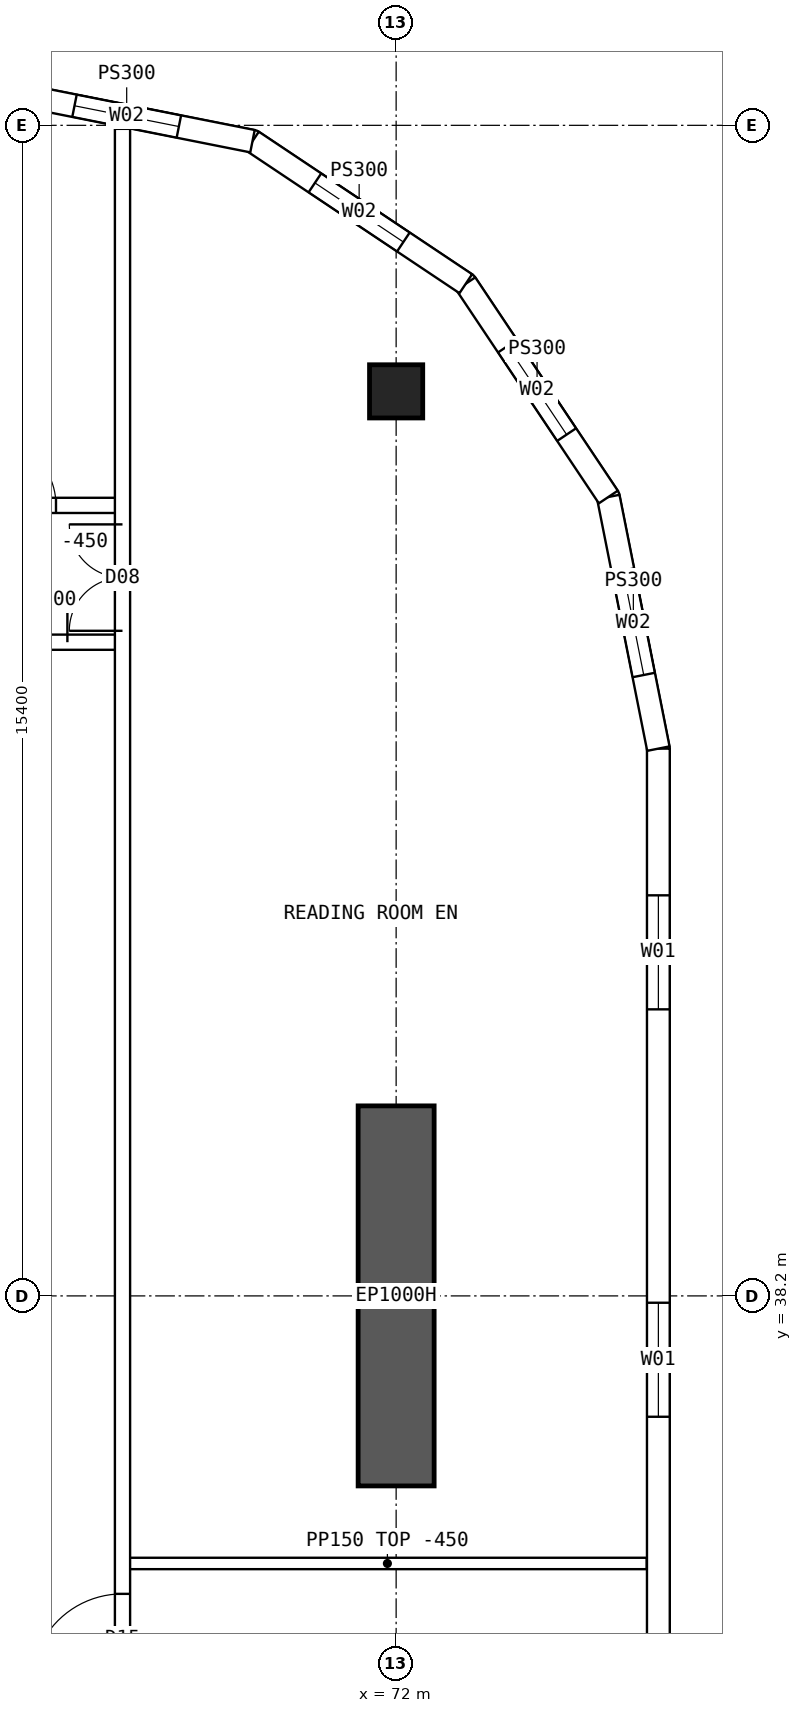
"""IFC4 building model, lengths in metres.
Left out: names, types, materials, properties, quantities, classifications, styles, units other than length and angle.
Written with IfcOpenShell. Run it as: python <this file> out.ifc"""

import sys

from ifc_helpers import new_model, si_unit, direction, frame, frame_2d, origin, origin_2d, place, context, subcontext, project, spatial, polyline, rectangle, hollow_rectangle, outline, extrude, element, fill, save


model = new_model("IFC4")
c1 = context("Model", 3, precision=1e-05, world=origin(), true_north=direction((0.0, 1.0)))
c2 = subcontext(c1, "Body", "Model", "MODEL_VIEW")
j1 = project(units=[si_unit("LENGTHUNIT", "METRE"), si_unit("PLANEANGLEUNIT", "RADIAN")], contexts=[c1])
p1 = place(None, origin())
s1 = spatial("IfcSite", under=j1, at=p1, CompositionType="ELEMENT")
p2 = place(p1, origin())
s2 = spatial("IfcBuilding", under=s1, at=p2, CompositionType="ELEMENT")
p3 = place(p2, frame((0.0, 0.0, 174.85)))
s3 = spatial("IfcBuildingStorey", under=s2, at=p3, CompositionType="ELEMENT", Elevation=174.85)
p4 = place(p3, frame((72.0, 50.1, 0.0), z_axis=(0.0, 0.0, 1.0), x_axis=(1.0, 0.0, 0.0)))
e1 = element("IfcColumn", 1, at=p4, inside=s3, PredefinedType="COLUMN", context=c2, shape_type="SweptSolid", body=[
    extrude(hollow_rectangle(XDim=0.7, YDim=0.7, WallThickness=0.07, at=origin_2d()), origin(), (0.0, 0.0, 1.0), 3.75),
])
p5 = place(p3, frame((72.0, 35.7, 0.0), z_axis=(0.0, 0.0, 1.0), x_axis=(0.0, 1.0, 0.0)))
e2 = element("IfcWall", 2, at=p5, inside=s3, PredefinedType="SHEAR", context=c2, shape_type="SweptSolid", body=[
    extrude(rectangle(XDim=5.0, YDim=1.0, at=frame_2d((2.5, 0.0))), origin(), (0.0, 0.0, 1.0), 3.75),
])
p6 = place(p3, frame((75.45, 18.6, 0.0), z_axis=(0.0, 0.0, 1.0), x_axis=(0.0, 1.0, 0.0)))
e3 = element("IfcWall", 3, at=p6, inside=s3, PredefinedType="SOLIDWALL", context=c2, shape_type="SweptSolid", body=[
    extrude(outline(polyline([(-0.015, -0.15), (26.815, -0.15), (26.785, 0.15), (0.015, 0.15), (-0.015, -0.15)])), origin(), (0.0, 0.0, 1.0), 3.3),
])
p7 = place(p6, frame((1.93, 0.0, 0.9)))
e4 = element("IfcOpeningElement", 4, at=p7, cuts=e3, PredefinedType="OPENING", context=c2, shape_type="SweptSolid", body=[
    extrude(rectangle(XDim=1.5, YDim=2.0, at=frame_2d((0.75, 1.0))), frame((0.0, 0.16, 0.0), z_axis=(0.0, -1.0, 0.0), x_axis=(1.0, 0.0, 0.0)), (0.0, 0.0, 1.0), 0.32),
])
p8 = place(p6, frame((7.29, 0.0, 0.9)))
e5 = element("IfcOpeningElement", 5, at=p8, cuts=e3, PredefinedType="OPENING", context=c2, shape_type="SweptSolid", body=[
    extrude(rectangle(XDim=1.5, YDim=2.0, at=frame_2d((0.75, 1.0))), frame((0.0, 0.16, 0.0), z_axis=(0.0, -1.0, 0.0), x_axis=(1.0, 0.0, 0.0)), (0.0, 0.0, 1.0), 0.32),
])
p9 = place(p6, frame((12.65, 0.0, 0.9)))
e6 = element("IfcOpeningElement", 6, at=p9, cuts=e3, PredefinedType="OPENING", context=c2, shape_type="SweptSolid", body=[
    extrude(rectangle(XDim=1.5, YDim=2.0, at=frame_2d((0.75, 1.0))), frame((0.0, 0.16, 0.0), z_axis=(0.0, -1.0, 0.0), x_axis=(1.0, 0.0, 0.0)), (0.0, 0.0, 1.0), 0.32),
])
p10 = place(p6, frame((18.01, 0.0, 0.9)))
e7 = element("IfcOpeningElement", 7, at=p10, cuts=e3, PredefinedType="OPENING", context=c2, shape_type="SweptSolid", body=[
    extrude(rectangle(XDim=1.5, YDim=2.0, at=frame_2d((0.75, 1.0))), frame((0.0, 0.16, 0.0), z_axis=(0.0, -1.0, 0.0), x_axis=(1.0, 0.0, 0.0)), (0.0, 0.0, 1.0), 0.32),
])
p11 = place(p6, frame((23.37, 0.0, 0.9)))
e8 = element("IfcOpeningElement", 8, at=p11, cuts=e3, PredefinedType="OPENING", context=c2, shape_type="SweptSolid", body=[
    extrude(rectangle(XDim=1.5, YDim=2.0, at=frame_2d((0.75, 1.0))), frame((0.0, 0.16, 0.0), z_axis=(0.0, -1.0, 0.0), x_axis=(1.0, 0.0, 0.0)), (0.0, 0.0, 1.0), 0.32),
])
p12 = place(p3, frame((75.45, 45.4, 0.0), z_axis=(0.0, 0.0, 1.0), x_axis=(-0.19508664885, 0.980786011034, 0.0)))
e9 = element("IfcWall", 9, at=p12, inside=s3, PredefinedType="SOLIDWALL", context=c2, shape_type="SweptSolid", body=[
    extrude(outline(polyline([(-0.015, -0.15), (3.405, -0.15), (3.345, 0.15), (0.015, 0.15), (-0.015, -0.15)])), origin(), (0.0, 0.0, 1.0), 3.3),
])
p13 = place(p12, frame((0.988, 0.0, 0.9)))
e10 = element("IfcOpeningElement", 10, at=p13, cuts=e9, PredefinedType="OPENING", context=c2, shape_type="SweptSolid", body=[
    extrude(rectangle(XDim=1.4, YDim=1.8, at=frame_2d((0.7, 0.9))), frame((0.0, 0.16, 0.0), z_axis=(0.0, -1.0, 0.0), x_axis=(1.0, 0.0, 0.0)), (0.0, 0.0, 1.0), 0.32),
])
p14 = place(p3, frame((74.792, 48.71, 0.0), z_axis=(0.0, 0.0, 1.0), x_axis=(-0.555534554399, 0.831493450887, 0.0)))
e11 = element("IfcWall", 11, at=p14, inside=s3, PredefinedType="SOLIDWALL", context=c2, shape_type="SweptSolid", body=[
    extrude(outline(polyline([(-0.03, -0.15), (3.405, -0.15), (3.345, 0.15), (0.03, 0.15), (-0.03, -0.15)])), origin(), (0.0, 0.0, 1.0), 3.3),
])
p15 = place(p14, frame((0.988, 0.0, 0.9)))
e12 = element("IfcOpeningElement", 12, at=p15, cuts=e11, PredefinedType="OPENING", context=c2, shape_type="SweptSolid", body=[
    extrude(rectangle(XDim=1.4, YDim=1.8, at=frame_2d((0.7, 0.9))), frame((0.0, 0.16, 0.0), z_axis=(0.0, -1.0, 0.0), x_axis=(1.0, 0.0, 0.0)), (0.0, 0.0, 1.0), 0.32),
])
p16 = place(p3, frame((72.917, 51.517, 0.0), z_axis=(0.0, 0.0, 1.0), x_axis=(-0.831493450887, 0.555534554399, 0.0)))
e13 = element("IfcWall", 13, at=p16, inside=s3, PredefinedType="SOLIDWALL", context=c2, shape_type="SweptSolid", body=[
    extrude(outline(polyline([(-0.03, -0.15), (3.405, -0.15), (3.345, 0.15), (0.03, 0.15), (-0.03, -0.15)])), origin(), (0.0, 0.0, 1.0), 3.3),
])
p17 = place(p16, frame((0.988, 0.0, 0.9)))
e14 = element("IfcOpeningElement", 14, at=p17, cuts=e13, PredefinedType="OPENING", context=c2, shape_type="SweptSolid", body=[
    extrude(rectangle(XDim=1.4, YDim=1.8, at=frame_2d((0.7, 0.9))), frame((0.0, 0.16, 0.0), z_axis=(0.0, -1.0, 0.0), x_axis=(1.0, 0.0, 0.0)), (0.0, 0.0, 1.0), 0.32),
])
p18 = place(p3, frame((70.11, 53.392, 0.0), z_axis=(0.0, 0.0, 1.0), x_axis=(-0.98078325777, 0.195100490205, 0.0)))
e15 = element("IfcWall", 15, at=p18, inside=s3, PredefinedType="SOLIDWALL", context=c2, shape_type="SweptSolid", body=[
    extrude(outline(polyline([(-0.03, -0.15), (3.405, -0.15), (3.345, 0.15), (0.03, 0.15), (-0.03, -0.15)])), origin(), (0.0, 0.0, 1.0), 3.3),
])
p19 = place(p18, frame((0.988, 0.0, 0.9)))
e16 = element("IfcOpeningElement", 16, at=p19, cuts=e15, PredefinedType="OPENING", context=c2, shape_type="SweptSolid", body=[
    extrude(rectangle(XDim=1.4, YDim=1.8, at=frame_2d((0.7, 0.9))), frame((0.0, 0.16, 0.0), z_axis=(0.0, -1.0, 0.0), x_axis=(1.0, 0.0, 0.0)), (0.0, 0.0, 1.0), 0.32),
])
p20 = place(p3, frame((66.425, 48.6, 0.0), z_axis=(0.0, 0.0, 1.0), x_axis=(1.0, 0.0, 0.0)))
e17 = element("IfcWall", 17, at=p20, inside=s3, PredefinedType="SOLIDWALL", context=c2, shape_type="SweptSolid", body=[
    extrude(rectangle(XDim=1.975, YDim=0.2, at=frame_2d((0.987, 0.0))), origin(), (0.0, 0.0, 1.0), 3.3),
])
p21 = place(p20, frame((0.2, 0.0, 0.0)))
e18 = element("IfcOpeningElement", 18, at=p21, cuts=e17, PredefinedType="OPENING", context=c2, shape_type="SweptSolid", body=[
    extrude(rectangle(XDim=0.9, YDim=2.1, at=frame_2d((0.45, 1.05))), frame((0.0, 0.11, 0.0), z_axis=(0.0, -1.0, 0.0), x_axis=(1.0, 0.0, 0.0)), (0.0, 0.0, 1.0), 0.22),
])
p22 = place(p3, frame((66.425, 46.8, 0.0), z_axis=(0.0, 0.0, 1.0), x_axis=(1.0, 0.0, 0.0)))
e19 = element("IfcWall", 19, at=p22, inside=s3, PredefinedType="SOLIDWALL", context=c2, shape_type="SweptSolid", body=[
    extrude(rectangle(XDim=1.975, YDim=0.2, at=frame_2d((0.987, 0.0))), origin(), (0.0, 0.0, 1.0), 3.3),
])
p23 = place(p22, frame((0.05, 0.0, 0.0)))
e20 = element("IfcOpeningElement", 20, at=p23, cuts=e19, PredefinedType="OPENING", context=c2, shape_type="SweptSolid", body=[
    extrude(rectangle(XDim=1.2, YDim=2.1, at=frame_2d((0.6, 1.05))), frame((0.0, 0.11, 0.0), z_axis=(0.0, -1.0, 0.0), x_axis=(1.0, 0.0, 0.0)), (0.0, 0.0, 1.0), 0.22),
])
p24 = place(p3, frame((68.4, 10.446, 0.0), z_axis=(0.0, 0.0, 1.0), x_axis=(0.0, 1.0, 0.0)))
e21 = element("IfcWall", 21, at=p24, inside=s3, PredefinedType="SOLIDWALL", context=c2, shape_type="SweptSolid", body=[
    extrude(rectangle(XDim=43.107, YDim=0.2, at=frame_2d((21.554, 0.0))), origin(), (0.0, 0.0, 1.0), 3.3),
])
p25 = place(p24, frame((13.914, 0.0, 0.0)))
e22 = element("IfcOpeningElement", 22, at=p25, cuts=e21, PredefinedType="OPENING", context=c2, shape_type="SweptSolid", body=[
    extrude(rectangle(XDim=1.2, YDim=2.1, at=frame_2d((0.6, 1.05))), frame((0.0, 0.11, 0.0), z_axis=(0.0, -1.0, 0.0), x_axis=(1.0, 0.0, 0.0)), (0.0, 0.0, 1.0), 0.22),
])
p26 = place(p24, frame((22.634, 0.0, 0.0)))
e23 = element("IfcOpeningElement", 23, at=p26, cuts=e21, PredefinedType="OPENING", context=c2, shape_type="SweptSolid", body=[
    extrude(rectangle(XDim=1.2, YDim=2.1, at=frame_2d((0.6, 1.05))), frame((0.0, 0.11, 0.0), z_axis=(0.0, -1.0, 0.0), x_axis=(1.0, 0.0, 0.0)), (0.0, 0.0, 1.0), 0.22),
])
p27 = place(p24, frame((5.104, 0.0, 0.0)))
e24 = element("IfcOpeningElement", 24, at=p27, cuts=e21, PredefinedType="OPENING", context=c2, shape_type="SweptSolid", body=[
    extrude(rectangle(XDim=1.4, YDim=2.1, at=frame_2d((0.7, 1.05))), frame((0.0, 0.11, 0.0), z_axis=(0.0, -1.0, 0.0), x_axis=(1.0, 0.0, 0.0)), (0.0, 0.0, 1.0), 0.22),
])
p28 = place(p24, frame((36.504, 0.0, 0.0)))
e25 = element("IfcOpeningElement", 25, at=p28, cuts=e21, PredefinedType="OPENING", context=c2, shape_type="SweptSolid", body=[
    extrude(rectangle(XDim=1.4, YDim=2.1, at=frame_2d((0.7, 1.05))), frame((0.0, 0.11, 0.0), z_axis=(0.0, -1.0, 0.0), x_axis=(1.0, 0.0, 0.0)), (0.0, 0.0, 1.0), 0.22),
])
p29 = place(p3, frame((68.475, 34.68, 0.0), z_axis=(0.0, 0.0, 1.0), x_axis=(1.0, 0.0, 0.0)))
e26 = element("IfcWall", 26, at=p29, inside=s3, PredefinedType="PARTITIONING", context=c2, shape_type="SweptSolid", body=[
    extrude(outline(polyline([(0.0, 0.0), (6.82, 0.0), (6.82, 3.3), (3.827, 3.3), (3.825, 2.85), (3.227, 2.85), (3.225, 3.3), (0.0, 3.3), (0.0, 0.0)])), frame((0.0, 0.075, 0.0), z_axis=(0.0, -1.0, 0.0), x_axis=(1.0, 0.0, 0.0)), (0.0, 0.0, 1.0), 0.15),
])
p30 = place(p10, origin())
e27 = element("IfcWindow", 27, at=p30, inside=s3, PartitioningType="SINGLE_PANEL", PredefinedType="WINDOW", context=c2, shape_type="SweptSolid", body=[
    extrude(rectangle(XDim=1.5, YDim=2.0, at=frame_2d((0.75, 1.0))), frame((0.0, 0.03, 0.0), z_axis=(0.0, -1.0, 0.0), x_axis=(1.0, 0.0, 0.0)), (0.0, 0.0, 1.0), 0.06),
])
fill(e7, e27)
p31 = place(p11, origin())
e28 = element("IfcWindow", 28, at=p31, inside=s3, PartitioningType="SINGLE_PANEL", PredefinedType="WINDOW", context=c2, shape_type="SweptSolid", body=[
    extrude(rectangle(XDim=1.5, YDim=2.0, at=frame_2d((0.75, 1.0))), frame((0.0, 0.03, 0.0), z_axis=(0.0, -1.0, 0.0), x_axis=(1.0, 0.0, 0.0)), (0.0, 0.0, 1.0), 0.06),
])
fill(e8, e28)
p32 = place(p13, origin())
e29 = element("IfcWindow", 29, at=p32, inside=s3, PartitioningType="SINGLE_PANEL", PredefinedType="WINDOW", context=c2, shape_type="SweptSolid", body=[
    extrude(rectangle(XDim=1.4, YDim=1.8, at=frame_2d((0.7, 0.9))), frame((0.0, 0.03, 0.0), z_axis=(0.0, -1.0, 0.0), x_axis=(1.0, 0.0, 0.0)), (0.0, 0.0, 1.0), 0.06),
])
fill(e10, e29)
p33 = place(p15, origin())
e30 = element("IfcWindow", 30, at=p33, inside=s3, PartitioningType="SINGLE_PANEL", PredefinedType="WINDOW", context=c2, shape_type="SweptSolid", body=[
    extrude(rectangle(XDim=1.4, YDim=1.8, at=frame_2d((0.7, 0.9))), frame((0.0, 0.03, 0.0), z_axis=(0.0, -1.0, 0.0), x_axis=(1.0, 0.0, 0.0)), (0.0, 0.0, 1.0), 0.06),
])
fill(e12, e30)
p34 = place(p17, origin())
e31 = element("IfcWindow", 31, at=p34, inside=s3, PartitioningType="SINGLE_PANEL", PredefinedType="WINDOW", context=c2, shape_type="SweptSolid", body=[
    extrude(rectangle(XDim=1.4, YDim=1.8, at=frame_2d((0.7, 0.9))), frame((0.0, 0.03, 0.0), z_axis=(0.0, -1.0, 0.0), x_axis=(1.0, 0.0, 0.0)), (0.0, 0.0, 1.0), 0.06),
])
fill(e14, e31)
p35 = place(p19, origin())
e32 = element("IfcWindow", 32, at=p35, inside=s3, PartitioningType="SINGLE_PANEL", PredefinedType="WINDOW", context=c2, shape_type="SweptSolid", body=[
    extrude(rectangle(XDim=1.4, YDim=1.8, at=frame_2d((0.7, 0.9))), frame((0.0, 0.03, 0.0), z_axis=(0.0, -1.0, 0.0), x_axis=(1.0, 0.0, 0.0)), (0.0, 0.0, 1.0), 0.06),
])
fill(e16, e32)
p36 = place(p23, origin())
e33 = element("IfcDoor", 33, at=p36, inside=s3, OperationType="DOUBLE_DOOR_SINGLE_SWING", PredefinedType="DOOR", context=c2, shape_type="SweptSolid", body=[
    extrude(rectangle(XDim=1.2, YDim=2.1, at=frame_2d((0.6, 1.05))), frame((0.0, 0.025, 0.0), z_axis=(0.0, -1.0, 0.0), x_axis=(1.0, 0.0, 0.0)), (0.0, 0.0, 1.0), 0.05),
])
fill(e20, e33)
p37 = place(p26, origin())
e34 = element("IfcDoor", 34, at=p37, inside=s3, OperationType="SINGLE_SWING_LEFT", PredefinedType="DOOR", context=c2, shape_type="SweptSolid", body=[
    extrude(rectangle(XDim=1.2, YDim=2.1, at=frame_2d((0.6, 1.05))), frame((0.0, 0.025, 0.0), z_axis=(0.0, -1.0, 0.0), x_axis=(1.0, 0.0, 0.0)), (0.0, 0.0, 1.0), 0.05),
])
fill(e23, e34)
p38 = place(p28, origin())
e35 = element("IfcDoor", 35, at=p38, inside=s3, OperationType="DOUBLE_DOOR_SINGLE_SWING", PredefinedType="DOOR", context=c2, shape_type="SweptSolid", body=[
    extrude(rectangle(XDim=1.4, YDim=2.1, at=frame_2d((0.7, 1.05))), frame((0.0, 0.025, 0.0), z_axis=(0.0, -1.0, 0.0), x_axis=(1.0, 0.0, 0.0)), (0.0, 0.0, 1.0), 0.05),
])
fill(e25, e35)
p39 = place(p21, origin())
e36 = element("IfcDoor", 36, at=p39, inside=s3, OperationType="SINGLE_SWING_LEFT", PredefinedType="DOOR", context=c2, shape_type="SweptSolid", body=[
    extrude(rectangle(XDim=0.9, YDim=2.1, at=frame_2d((0.45, 1.05))), frame((0.0, 0.025, 0.0), z_axis=(0.0, -1.0, 0.0), x_axis=(1.0, 0.0, 0.0)), (0.0, 0.0, 1.0), 0.05),
])
fill(e18, e36)
save(model, sys.argv[1])
